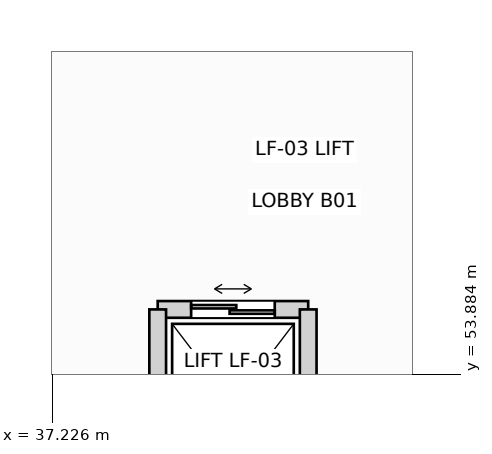
"""IFC4 building model, lengths in metres.
Left out: names, types, materials, properties, quantities, classifications, styles, units other than length and angle.
Written with IfcOpenShell. Run it as: python <this file> out.ifc"""

import sys

from ifc_helpers import new_model, si_unit, direction, frame, frame_2d, origin, place, context, subcontext, project, spatial, rectangle, extrude, element, fill, save


model = new_model("IFC4")
c1 = context("Model", 3, precision=1e-05, world=origin(), true_north=direction((0.0, 1.0)))
c2 = subcontext(c1, "Body", "Model", "MODEL_VIEW")
j1 = project(units=[si_unit("LENGTHUNIT", "METRE"), si_unit("PLANEANGLEUNIT", "RADIAN")], contexts=[c1])
p1 = place(None, origin())
s1 = spatial("IfcSite", under=j1, at=p1, CompositionType="ELEMENT")
p2 = place(p1, origin())
s2 = spatial("IfcBuilding", under=s1, at=p2, CompositionType="ELEMENT")
p3 = place(p2, frame((0.0, 0.0, -5.4)))
s3 = spatial("IfcBuildingStorey", under=s2, at=p3, CompositionType="ELEMENT", Elevation=-5.4)
p4 = place(p3, frame((38.61, 54.74, 0.0), z_axis=(0.0, 0.0, 1.0), x_axis=(1.0, 0.0, 0.0)))
e1 = element("IfcWall", 1, at=p4, inside=s3, PredefinedType="PARTITIONING", context=c2, shape_type="SweptSolid", body=[
    extrude(rectangle(XDim=1.98, YDim=0.22, at=frame_2d((0.99, 0.0))), origin(), (0.0, 0.0, 1.0), 5.045),
])
p5 = place(p4, frame((0.44, 0.0, 0.0)))
e2 = element("IfcOpeningElement", 2, at=p5, cuts=e1, PredefinedType="OPENING", context=c2, shape_type="SweptSolid", body=[
    extrude(rectangle(XDim=1.1, YDim=2.18, at=frame_2d((0.55, 1.09))), frame((0.0, 0.12, 0.0), z_axis=(0.0, -1.0, 0.0), x_axis=(1.0, 0.0, 0.0)), (0.0, 0.0, 1.0), 0.24),
])
for number, where, z_axis, x_axis in (
    (3, (38.61, 52.26, 0.0), (0.0, 0.0, 1.0), (0.0, 1.0, 0.0)),
    (4, (40.59, 52.26, 0.0), (0.0, 0.0, 1.0), (0.0, 1.0, 0.0)),
):
    element("IfcWall", number, at=place(p3, frame(where, z_axis=z_axis, x_axis=x_axis)), inside=s3, PredefinedType="PARTITIONING", context=c2, shape_type="SweptSolid", body=[
        extrude(rectangle(XDim=2.48, YDim=0.22, at=frame_2d((1.24, 0.0))), origin(), (0.0, 0.0, 1.0), 4.685),
    ])
p6 = place(p5, origin())
e5 = element("IfcDoor", 5, at=p6, inside=s3, OperationType="DOUBLE_DOOR_SLIDING", PredefinedType="DOOR", context=c2, shape_type="SweptSolid", body=[
    extrude(rectangle(XDim=1.1, YDim=2.18, at=frame_2d((0.55, 1.09))), frame((0.0, 0.025, 0.0), z_axis=(0.0, -1.0, 0.0), x_axis=(1.0, 0.0, 0.0)), (0.0, 0.0, 1.0), 0.05),
])
fill(e2, e5)
save(model, sys.argv[1])
